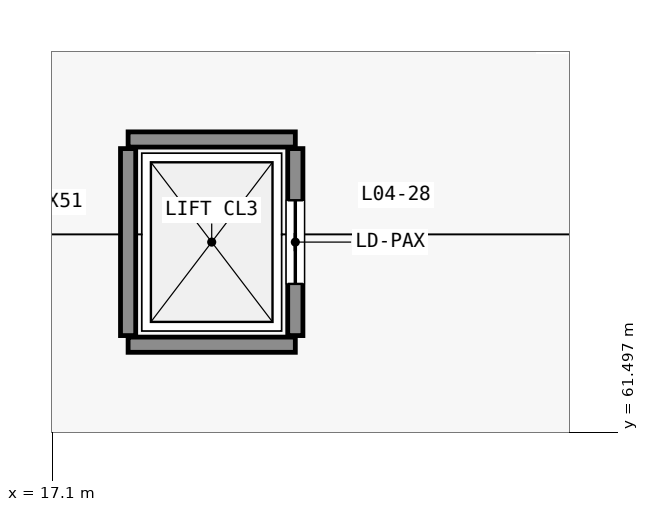
"""IFC4 building model, lengths in metres.
Left out: names, types, materials, properties, quantities, classifications, styles, units other than length and angle.
Written with IfcOpenShell. Run it as: python <this file> out.ifc"""

import sys

from ifc_helpers import new_model, si_unit, direction, frame, frame_2d, origin, place, context, subcontext, project, spatial, rectangle, extrude, element, fill, save


model = new_model("IFC4")
c1 = context("Model", 3, precision=1e-05, world=origin(), true_north=direction((0.0, 1.0)))
c2 = subcontext(c1, "Body", "Model", "MODEL_VIEW")
j1 = project(units=[si_unit("LENGTHUNIT", "METRE"), si_unit("PLANEANGLEUNIT", "RADIAN")], contexts=[c1])
p1 = place(None, origin())
s1 = spatial("IfcSite", under=j1, at=p1, CompositionType="ELEMENT")
p2 = place(p1, origin())
s2 = spatial("IfcBuilding", under=s1, at=p2, CompositionType="ELEMENT")
p3 = place(p2, frame((0.0, 0.0, 21.0)))
s3 = spatial("IfcBuildingStorey", under=s2, at=p3, CompositionType="ELEMENT", Elevation=21.0)
for number, where, z_axis, x_axis in (
    (1, (18.1, 62.65, 0.0), (0.0, 0.0, 1.0), (1.0, 0.0, 0.0)),
    (2, (18.1, 65.35, 0.0), (0.0, 0.0, 1.0), (1.0, 0.0, 0.0)),
):
    element("IfcWall", number, at=place(p3, frame(where, z_axis=z_axis, x_axis=x_axis)), inside=s3, PredefinedType="STANDARD", context=c2, shape_type="SweptSolid", body=[
        extrude(rectangle(XDim=2.2, YDim=0.2, at=frame_2d((1.1, 0.0))), origin(), (0.0, 0.0, 1.0), 5.06),
    ])
p4 = place(p3, frame((18.1, 62.77, 0.0), z_axis=(0.0, 0.0, 1.0), x_axis=(0.0, 1.0, 0.0)))
e3 = element("IfcWall", 3, at=p4, inside=s3, PredefinedType="STANDARD", context=c2, shape_type="SweptSolid", body=[
    extrude(rectangle(XDim=2.46, YDim=0.2, at=frame_2d((1.23, 0.0))), origin(), (0.0, 0.0, 1.0), 5.06),
])
p5 = place(p3, frame((20.3, 62.77, 0.0), z_axis=(0.0, 0.0, 1.0), x_axis=(0.0, 1.0, 0.0)))
e4 = element("IfcWall", 4, at=p5, inside=s3, PredefinedType="STANDARD", context=c2, shape_type="SweptSolid", body=[
    extrude(rectangle(XDim=2.46, YDim=0.2, at=frame_2d((1.23, 0.0))), origin(), (0.0, 0.0, 1.0), 5.06),
])
p6 = place(p5, frame((0.68, 0.0, 0.0)))
e5 = element("IfcOpeningElement", 5, at=p6, cuts=e4, PredefinedType="OPENING", context=c2, shape_type="SweptSolid", body=[
    extrude(rectangle(XDim=1.1, YDim=2.15, at=frame_2d((0.55, 1.075))), frame((0.0, 0.11, 0.0), z_axis=(0.0, -1.0, 0.0), x_axis=(1.0, 0.0, 0.0)), (0.0, 0.0, 1.0), 0.22),
])
p7 = place(p6, origin())
e6 = element("IfcDoor", 6, at=p7, inside=s3, OperationType="SLIDING_TO_LEFT", PredefinedType="DOOR", context=c2, shape_type="SweptSolid", body=[
    extrude(rectangle(XDim=1.1, YDim=2.15, at=frame_2d((0.55, 1.075))), frame((0.0, 0.025, 0.0), z_axis=(0.0, -1.0, 0.0), x_axis=(1.0, 0.0, 0.0)), (0.0, 0.0, 1.0), 0.05),
])
fill(e5, e6)
save(model, sys.argv[1])
